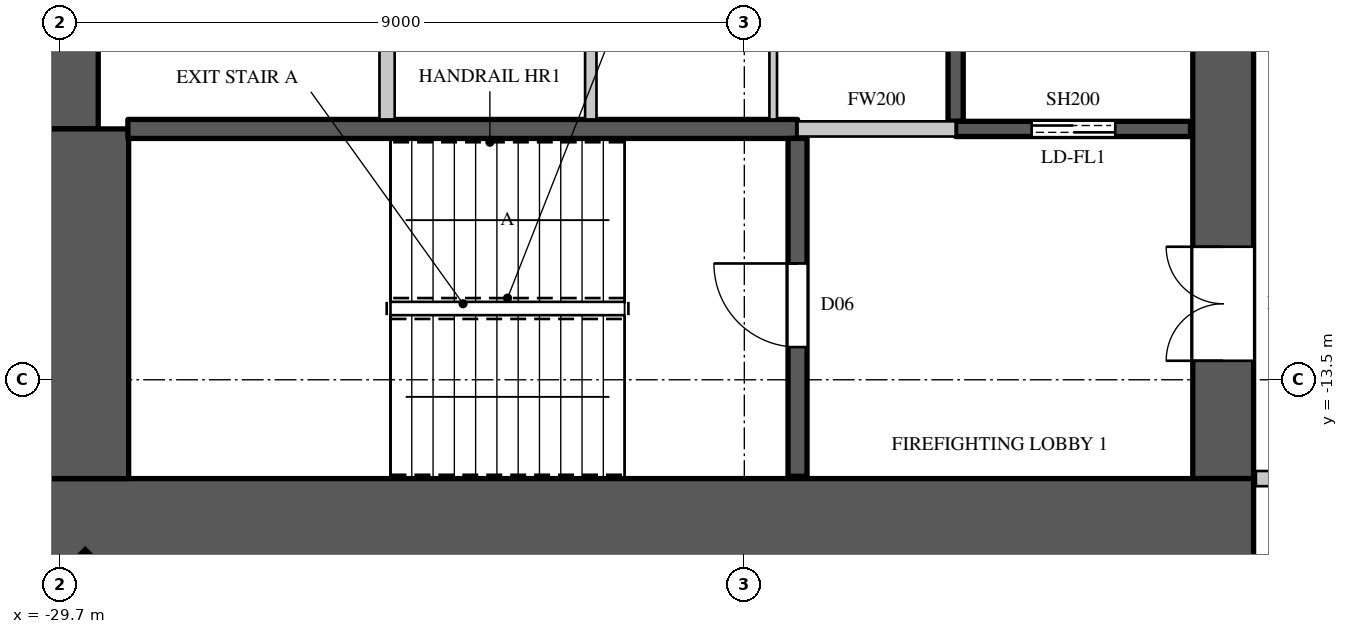
"""IFC4 building model, lengths in metres.
Left out: names, types, materials, properties, quantities, classifications, styles, units other than length and angle.
Written with IfcOpenShell. Run it as: python <this file> out.ifc"""

import sys

from ifc_helpers import new_model, si_unit, direction, frame, frame_2d, origin, origin_2d, place, context, subcontext, project, spatial, rectangle, extrude, element, fill, save


model = new_model("IFC4")
c1 = context("Model", 3, precision=1e-05, world=origin(), true_north=direction((0.0, 1.0)))
c2 = subcontext(c1, "Body", "Model", "MODEL_VIEW")
j1 = project(units=[si_unit("LENGTHUNIT", "METRE"), si_unit("PLANEANGLEUNIT", "RADIAN")], contexts=[c1])
p1 = place(None, origin())
s1 = spatial("IfcSite", under=j1, at=p1, CompositionType="ELEMENT")
p2 = place(p1, origin())
s2 = spatial("IfcBuilding", under=s1, at=p2, CompositionType="ELEMENT")
p3 = place(p2, frame((0.0, 0.0, 217.9)))
s3 = spatial("IfcBuildingStorey", under=s2, at=p3, CompositionType="ELEMENT", Elevation=217.9)
p4 = place(p3, frame((-29.443, -16.443, 0.0), z_axis=(0.0, 0.0, 1.0), x_axis=(0.707106781187, -0.707106781187, 0.0)))
e1 = element("IfcColumn", 1, at=p4, inside=s3, PredefinedType="COLUMN", context=c2, shape_type="SweptSolid", body=[
    extrude(rectangle(XDim=0.9, YDim=1.1, at=origin_2d()), origin(), (0.0, 0.0, 1.0), 4.1),
])
p5 = place(p3, frame((-30.0, -15.4, 0.0), z_axis=(0.0, 0.0, 1.0), x_axis=(1.0, 0.0, 0.0)))
e2 = element("IfcWall", 2, at=p5, inside=s3, PredefinedType="SHEAR", context=c2, shape_type="SweptSolid", body=[
    extrude(rectangle(XDim=16.0, YDim=1.2, at=frame_2d((8.0, 0.0))), origin(), (0.0, 0.0, 1.0), 4.1),
])
p6 = place(p3, frame((-14.4, -14.8, 0.0), z_axis=(0.0, 0.0, 1.0), x_axis=(0.0, 1.0, 0.0)))
e3 = element("IfcWall", 3, at=p6, inside=s3, PredefinedType="SHEAR", context=c2, shape_type="SweptSolid", body=[
    extrude(rectangle(XDim=29.6, YDim=0.8, at=frame_2d((14.8, 0.0))), origin(), (0.0, 0.0, 1.0), 4.1),
])
p7 = place(p6, frame((1.55, 0.0, 0.0)))
e4 = element("IfcOpeningElement", 4, at=p7, cuts=e3, PredefinedType="OPENING", context=c2, shape_type="SweptSolid", body=[
    extrude(rectangle(XDim=1.5, YDim=2.4, at=frame_2d((0.75, 1.2))), frame((0.0, 0.41, 0.0), z_axis=(0.0, -1.0, 0.0), x_axis=(1.0, 0.0, 0.0)), (0.0, 0.0, 1.0), 0.82),
])
p8 = place(p6, frame((26.55, 0.0, 0.0)))
e5 = element("IfcOpeningElement", 5, at=p8, cuts=e3, PredefinedType="OPENING", context=c2, shape_type="SweptSolid", body=[
    extrude(rectangle(XDim=1.5, YDim=2.4, at=frame_2d((0.75, 1.2))), frame((0.0, 0.41, 0.0), z_axis=(0.0, -1.0, 0.0), x_axis=(1.0, 0.0, 0.0)), (0.0, 0.0, 1.0), 0.82),
])
p9 = place(p6, frame((8.45, 0.0, 0.0)))
e6 = element("IfcOpeningElement", 6, at=p9, cuts=e3, PredefinedType="OPENING", context=c2, shape_type="SweptSolid", body=[
    extrude(rectangle(XDim=1.5, YDim=2.4, at=frame_2d((0.75, 1.2))), frame((0.0, 0.41, 0.0), z_axis=(0.0, -1.0, 0.0), x_axis=(1.0, 0.0, 0.0)), (0.0, 0.0, 1.0), 0.82),
])
p10 = place(p6, frame((19.65, 0.0, 0.0)))
e7 = element("IfcOpeningElement", 7, at=p10, cuts=e3, PredefinedType="OPENING", context=c2, shape_type="SweptSolid", body=[
    extrude(rectangle(XDim=1.5, YDim=2.4, at=frame_2d((0.75, 1.2))), frame((0.0, 0.41, 0.0), z_axis=(0.0, -1.0, 0.0), x_axis=(1.0, 0.0, 0.0)), (0.0, 0.0, 1.0), 0.82),
])
p11 = place(p6, frame((14.5, 0.0, 0.0)))
e8 = element("IfcOpeningElement", 8, at=p11, cuts=e3, PredefinedType="OPENING", context=c2, shape_type="SweptSolid", body=[
    extrude(rectangle(XDim=0.6, YDim=2.0, at=frame_2d((0.3, 1.0))), frame((0.0, 0.41, 0.0), z_axis=(0.0, -1.0, 0.0), x_axis=(1.0, 0.0, 0.0)), (0.0, 0.0, 1.0), 0.82),
])
p12 = place(p3, frame((-29.6, -10.2, 0.0), z_axis=(0.0, 0.0, 1.0), x_axis=(0.0, 1.0, 0.0)))
e9 = element("IfcWall", 9, at=p12, inside=s3, PredefinedType="SHEAR", context=c2, shape_type="SweptSolid", body=[
    extrude(rectangle(XDim=20.4, YDim=0.8, at=frame_2d((10.2, 0.0))), origin(), (0.0, 0.0, 1.0), 4.1),
])
p13 = place(p3, frame((-29.4, -14.8, 0.0), z_axis=(0.0, 0.0, 1.0), x_axis=(0.0, 1.0, 0.0)))
e10 = element("IfcWall", 10, at=p13, inside=s3, PredefinedType="SHEAR", context=c2, shape_type="SweptSolid", body=[
    extrude(rectangle(XDim=4.6, YDim=1.2, at=frame_2d((2.3, 0.0))), origin(), (0.0, 0.0, 1.0), 4.1),
])
p14 = place(p3, frame((-20.0, -10.2, 0.0), z_axis=(0.0, 0.0, 1.0), x_axis=(1.0, 0.0, 0.0)))
e11 = element("IfcWall", 11, at=p14, inside=s3, PredefinedType="PARTITIONING", context=c2, shape_type="SweptSolid", body=[
    extrude(rectangle(XDim=2.08, YDim=0.2, at=frame_2d((1.04, 0.0))), origin(), (0.0, 0.0, 1.0), 3.8),
])
p15 = place(p3, frame((-13.97, -14.8, 0.0), z_axis=(0.0, 0.0, 1.0), x_axis=(1.0, 0.0, 0.0)))
e12 = element("IfcWall", 12, at=p15, inside=s3, PredefinedType="PARTITIONING", context=c2, shape_type="SweptSolid", body=[
    extrude(rectangle(XDim=2.87, YDim=0.2, at=frame_2d((1.435, 0.0))), origin(), (0.0, 0.0, 1.0), 3.8),
])
p16 = place(p3, frame((-22.72, -10.075, 0.0), z_axis=(0.0, 0.0, 1.0), x_axis=(0.0, 1.0, 0.0)))
e13 = element("IfcWall", 13, at=p16, inside=s3, PredefinedType="PARTITIONING", context=c2, shape_type="SweptSolid", body=[
    extrude(rectangle(XDim=2.575, YDim=0.15, at=frame_2d((1.288, 0.0))), origin(), (0.0, 0.0, 1.0), 3.8),
])
p17 = place(p3, frame((-25.4, -10.075, 0.0), z_axis=(0.0, 0.0, 1.0), x_axis=(0.0, 1.0, 0.0)))
e14 = element("IfcWall", 14, at=p17, inside=s3, PredefinedType="PARTITIONING", context=c2, shape_type="SweptSolid", body=[
    extrude(rectangle(XDim=2.575, YDim=0.2, at=frame_2d((1.288, 0.0))), origin(), (0.0, 0.0, 1.0), 3.8),
])
p18 = place(p3, frame((-17.92, -10.1, 0.0), z_axis=(0.0, 0.0, 1.0), x_axis=(0.0, 1.0, 0.0)))
e15 = element("IfcWall", 15, at=p18, inside=s3, PredefinedType="SHEAR", context=c2, shape_type="SweptSolid", body=[
    extrude(rectangle(XDim=2.6, YDim=0.2, at=frame_2d((1.3, 0.0))), origin(), (0.0, 0.0, 1.0), 3.8),
])
p19 = place(p3, frame((-17.92, -10.2, 0.0), z_axis=(0.0, 0.0, 1.0), x_axis=(1.0, 0.0, 0.0)))
e16 = element("IfcWall", 16, at=p19, inside=s3, PredefinedType="SHEAR", context=c2, shape_type="SweptSolid", body=[
    extrude(rectangle(XDim=3.09, YDim=0.2, at=frame_2d((1.545, 0.0))), origin(), (0.0, 0.0, 1.0), 3.8),
])
p20 = place(p19, frame((1.0, 0.0, 0.0)))
e17 = element("IfcOpeningElement", 17, at=p20, cuts=e16, PredefinedType="OPENING", context=c2, shape_type="SweptSolid", body=[
    extrude(rectangle(XDim=1.1, YDim=2.2, at=frame_2d((0.55, 1.1))), frame((0.0, 0.11, 0.0), z_axis=(0.0, -1.0, 0.0), x_axis=(1.0, 0.0, 0.0)), (0.0, 0.0, 1.0), 0.22),
])
p21 = place(p3, frame((-28.81, -10.2, 0.0), z_axis=(0.0, 0.0, 1.0), x_axis=(1.0, 0.0, 0.0)))
e18 = element("IfcWall", 18, at=p21, inside=s3, PredefinedType="SHEAR", context=c2, shape_type="SweptSolid", body=[
    extrude(rectangle(XDim=8.81, YDim=0.25, at=frame_2d((4.405, 0.0))), origin(), (0.0, 0.0, 1.0), 3.8),
])
p22 = place(p3, frame((-20.0, -14.77, 0.0), z_axis=(0.0, 0.0, 1.0), x_axis=(0.0, 1.0, 0.0)))
e19 = element("IfcWall", 19, at=p22, inside=s3, PredefinedType="SHEAR", context=c2, shape_type="SweptSolid", body=[
    extrude(rectangle(XDim=4.445, YDim=0.25, at=frame_2d((2.223, 0.0))), origin(), (0.0, 0.0, 1.0), 3.8),
])
p23 = place(p22, frame((1.7, 0.0, 0.0)))
e20 = element("IfcOpeningElement", 20, at=p23, cuts=e19, PredefinedType="OPENING", context=c2, shape_type="SweptSolid", body=[
    extrude(rectangle(XDim=1.1, YDim=2.2, at=frame_2d((0.55, 1.1))), frame((0.0, 0.135, 0.0), z_axis=(0.0, -1.0, 0.0), x_axis=(1.0, 0.0, 0.0)), (0.0, 0.0, 1.0), 0.27),
])
p24 = place(p3, frame((-20.32, -10.075, 0.0), z_axis=(0.0, 0.0, 1.0), x_axis=(0.0, 1.0, 0.0)))
e21 = element("IfcWall", 21, at=p24, inside=s3, PredefinedType="PARTITIONING", context=c2, shape_type="SweptSolid", body=[
    extrude(rectangle(XDim=2.575, YDim=0.1, at=frame_2d((1.288, 0.0))), origin(), (0.0, 0.0, 1.0), 3.8),
])
p25 = place(p23, origin())
e22 = element("IfcDoor", 22, at=p25, inside=s3, OperationType="SINGLE_SWING_RIGHT", PredefinedType="DOOR", context=c2, shape_type="SweptSolid", body=[
    extrude(rectangle(XDim=1.1, YDim=2.2, at=frame_2d((0.55, 1.1))), frame((0.0, 0.025, 0.0), z_axis=(0.0, -1.0, 0.0), x_axis=(1.0, 0.0, 0.0)), (0.0, 0.0, 1.0), 0.05),
])
fill(e20, e22)
p26 = place(p20, origin())
e23 = element("IfcDoor", 23, at=p26, inside=s3, OperationType="DOUBLE_DOOR_SLIDING", PredefinedType="DOOR", context=c2, shape_type="SweptSolid", body=[
    extrude(rectangle(XDim=1.1, YDim=2.2, at=frame_2d((0.55, 1.1))), frame((0.0, 0.025, 0.0), z_axis=(0.0, -1.0, 0.0), x_axis=(1.0, 0.0, 0.0)), (0.0, 0.0, 1.0), 0.05),
])
fill(e17, e23)
p27 = place(p7, origin())
e24 = element("IfcDoor", 24, at=p27, inside=s3, OperationType="DOUBLE_DOOR_SINGLE_SWING", PredefinedType="DOOR", context=c2, shape_type="SweptSolid", body=[
    extrude(rectangle(XDim=1.5, YDim=2.4, at=frame_2d((0.75, 1.2))), frame((0.0, 0.395, 0.0), z_axis=(0.0, -1.0, 0.0), x_axis=(1.0, 0.0, 0.0)), (0.0, 0.0, 1.0), 0.05),
])
fill(e4, e24)
save(model, sys.argv[1])
